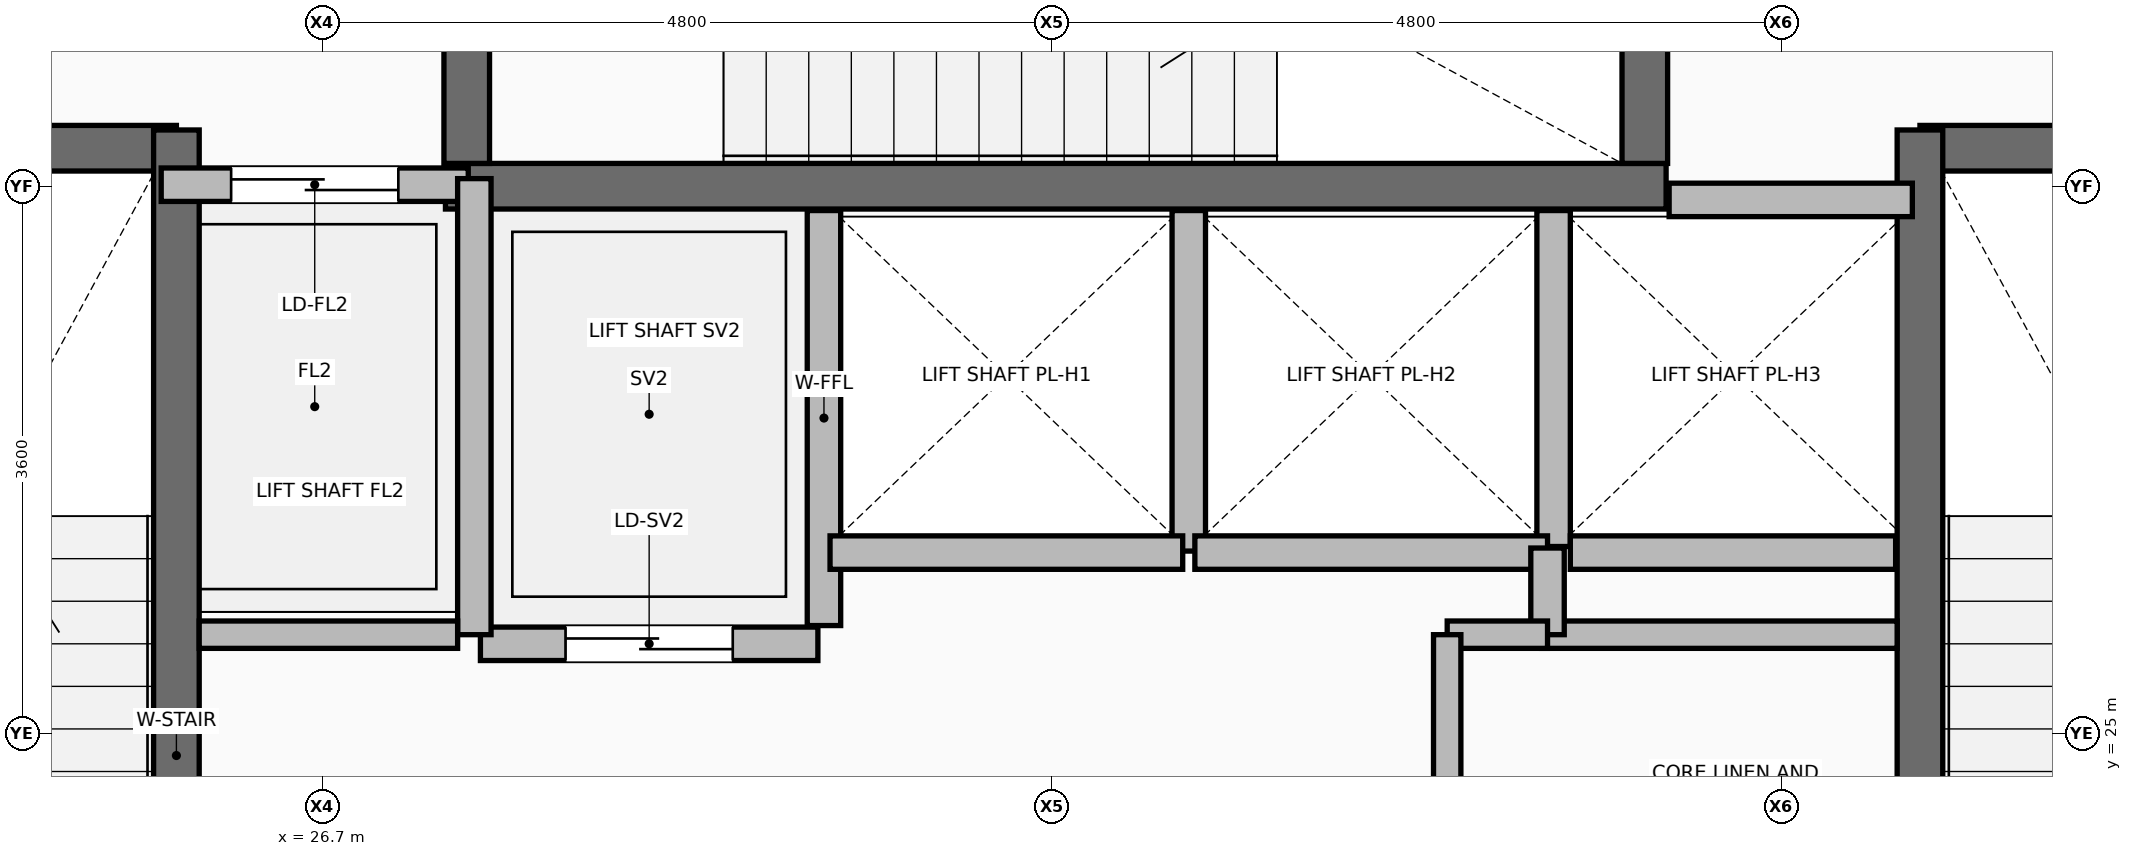
"""IFC4 building model, lengths in metres.
Left out: names, types, materials, properties, quantities, classifications, styles, units other than length and angle.
Written with IfcOpenShell. Run it as: python <this file> out.ifc"""

import sys

from ifc_helpers import new_model, si_unit, direction, frame, frame_2d, origin, place, context, subcontext, project, spatial, rectangle, extrude, element, fill, save


model = new_model("IFC4")
c1 = context("Model", 3, precision=1e-05, world=origin(), true_north=direction((0.0, 1.0)))
c2 = subcontext(c1, "Body", "Model", "MODEL_VIEW")
j1 = project(units=[si_unit("LENGTHUNIT", "METRE"), si_unit("PLANEANGLEUNIT", "RADIAN")], contexts=[c1])
p1 = place(None, origin())
s1 = spatial("IfcSite", under=j1, at=p1, CompositionType="ELEMENT")
p2 = place(p1, origin())
s2 = spatial("IfcBuilding", under=s1, at=p2, CompositionType="ELEMENT")
p3 = place(p2, frame((0.0, 0.0, 290.1)))
s3 = spatial("IfcBuildingStorey", under=s2, at=p3, CompositionType="ELEMENT", Elevation=290.1)
p4 = place(p3, frame((30.0, 25.71, 0.0), z_axis=(0.0, 0.0, 1.0), x_axis=(0.0, 1.0, 0.0)))
e1 = element("IfcWall", 1, at=p4, inside=s3, PredefinedType="PARTITIONING", context=c2, shape_type="SweptSolid", body=[
    extrude(rectangle(XDim=2.73, YDim=0.22, at=frame_2d((1.365, 0.0))), origin(), (0.0, 0.0, 1.0), 4.595),
])
p5 = place(p3, frame((32.4, 26.2, 0.0), z_axis=(0.0, 0.0, 1.0), x_axis=(0.0, 1.0, 0.0)))
e2 = element("IfcWall", 2, at=p5, inside=s3, PredefinedType="PARTITIONING", context=c2, shape_type="SweptSolid", body=[
    extrude(rectangle(XDim=2.24, YDim=0.22, at=frame_2d((1.12, 0.0))), origin(), (0.0, 0.0, 1.0), 4.595),
])
p6 = place(p3, frame((34.8, 26.23, 0.0), z_axis=(0.0, 0.0, 1.0), x_axis=(0.0, 1.0, 0.0)))
e3 = element("IfcWall", 3, at=p6, inside=s3, PredefinedType="PARTITIONING", context=c2, shape_type="SweptSolid", body=[
    extrude(rectangle(XDim=2.21, YDim=0.22, at=frame_2d((1.105, 0.0))), origin(), (0.0, 0.0, 1.0), 4.595),
])
p7 = place(p3, frame((34.91, 26.19, 0.0), z_axis=(0.0, 0.0, 1.0), x_axis=(1.0, 0.0, 0.0)))
e4 = element("IfcWall", 4, at=p7, inside=s3, PredefinedType="PARTITIONING", context=c2, shape_type="SweptSolid", body=[
    extrude(rectangle(XDim=2.14, YDim=0.22, at=frame_2d((1.07, 0.0))), origin(), (0.0, 0.0, 1.0), 4.595),
])
p8 = place(p3, frame((22.075, 28.85, 0.0), z_axis=(0.0, 0.0, 1.0), x_axis=(1.0, 0.0, 0.0)))
e5 = element("IfcWall", 5, at=p8, inside=s3, PredefinedType="SHEAR", context=c2, shape_type="SweptSolid", body=[
    extrude(rectangle(XDim=3.665, YDim=0.3, at=frame_2d((1.833, 0.0))), origin(), (0.0, 0.0, 1.0), 4.62),
])
p9 = place(p3, frame((25.74, 20.98, 0.0), z_axis=(0.0, 0.0, 1.0), x_axis=(0.0, 1.0, 0.0)))
e6 = element("IfcWall", 6, at=p9, inside=s3, PredefinedType="SHEAR", context=c2, shape_type="SweptSolid", body=[
    extrude(rectangle(XDim=7.99, YDim=0.3, at=frame_2d((3.995, 0.0))), origin(), (0.0, 0.0, 1.0), 4.62),
])
p10 = place(p3, frame((37.21, 28.85, 0.0), z_axis=(0.0, 0.0, 1.0), x_axis=(1.0, 0.0, 0.0)))
e7 = element("IfcWall", 7, at=p10, inside=s3, PredefinedType="SHEAR", context=c2, shape_type="SweptSolid", body=[
    extrude(rectangle(XDim=3.715, YDim=0.3, at=frame_2d((1.857, 0.0))), origin(), (0.0, 0.0, 1.0), 4.62),
])
p11 = place(p3, frame((37.21, 20.98, 0.0), z_axis=(0.0, 0.0, 1.0), x_axis=(0.0, 1.0, 0.0)))
e8 = element("IfcWall", 8, at=p11, inside=s3, PredefinedType="SHEAR", context=c2, shape_type="SweptSolid", body=[
    extrude(rectangle(XDim=7.99, YDim=0.3, at=frame_2d((3.995, 0.0))), origin(), (0.0, 0.0, 1.0), 4.62),
])
p12 = place(p3, frame((27.51, 28.6, 0.0), z_axis=(0.0, 0.0, 1.0), x_axis=(1.0, 0.0, 0.0)))
e9 = element("IfcWall", 9, at=p12, inside=s3, PredefinedType="SHEAR", context=c2, shape_type="SweptSolid", body=[
    extrude(rectangle(XDim=8.03, YDim=0.3, at=frame_2d((4.015, 0.0))), origin(), (0.0, 0.0, 1.0), 4.62),
])
p13 = place(p3, frame((27.65, 28.75, 0.0), z_axis=(0.0, 0.0, 1.0), x_axis=(0.0, 1.0, 0.0)))
e10 = element("IfcWall", 10, at=p13, inside=s3, PredefinedType="SHEAR", context=c2, shape_type="SweptSolid", body=[
    extrude(rectangle(XDim=3.525, YDim=0.3, at=frame_2d((1.762, 0.0))), origin(), (0.0, 0.0, 1.0), 4.62),
])
p14 = place(p13, frame((1.0, 0.0, 0.0)))
e11 = element("IfcOpeningElement", 11, at=p14, cuts=e10, PredefinedType="OPENING", context=c2, shape_type="SweptSolid", body=[
    extrude(rectangle(XDim=1.05, YDim=2.1, at=frame_2d((0.525, 1.05))), frame((0.0, 0.16, 0.0), z_axis=(0.0, -1.0, 0.0), x_axis=(1.0, 0.0, 0.0)), (0.0, 0.0, 1.0), 0.32),
])
p15 = place(p3, frame((35.4, 28.75, 0.0), z_axis=(0.0, 0.0, 1.0), x_axis=(0.0, 1.0, 0.0)))
e12 = element("IfcWall", 12, at=p15, inside=s3, PredefinedType="SHEAR", context=c2, shape_type="SweptSolid", body=[
    extrude(rectangle(XDim=3.525, YDim=0.3, at=frame_2d((1.762, 0.0))), origin(), (0.0, 0.0, 1.0), 4.62),
])
p16 = place(p3, frame((25.64, 28.61, 0.0), z_axis=(0.0, 0.0, 1.0), x_axis=(1.0, 0.0, 0.0)))
e13 = element("IfcWall", 13, at=p16, inside=s3, PredefinedType="PARTITIONING", context=c2, shape_type="SweptSolid", body=[
    extrude(rectangle(XDim=2.02, YDim=0.22, at=frame_2d((1.01, 0.0))), origin(), (0.0, 0.0, 1.0), 4.6),
])
p17 = place(p16, frame((0.46, 0.0, 0.0)))
e14 = element("IfcOpeningElement", 14, at=p17, cuts=e13, PredefinedType="OPENING", context=c2, shape_type="SweptSolid", body=[
    extrude(rectangle(XDim=1.1, YDim=2.2, at=frame_2d((0.55, 1.1))), frame((0.0, 0.12, 0.0), z_axis=(0.0, -1.0, 0.0), x_axis=(1.0, 0.0, 0.0)), (0.0, 0.0, 1.0), 0.24),
])
p18 = place(p3, frame((27.74, 25.59, 0.0), z_axis=(0.0, 0.0, 1.0), x_axis=(1.0, 0.0, 0.0)))
e15 = element("IfcWall", 15, at=p18, inside=s3, PredefinedType="PARTITIONING", context=c2, shape_type="SweptSolid", body=[
    extrude(rectangle(XDim=2.22, YDim=0.22, at=frame_2d((1.11, 0.0))), origin(), (0.0, 0.0, 1.0), 4.6),
])
p19 = place(p18, frame((0.56, 0.0, 0.0)))
e16 = element("IfcOpeningElement", 16, at=p19, cuts=e15, PredefinedType="OPENING", context=c2, shape_type="SweptSolid", body=[
    extrude(rectangle(XDim=1.1, YDim=2.2, at=frame_2d((0.55, 1.1))), frame((0.0, 0.12, 0.0), z_axis=(0.0, -1.0, 0.0), x_axis=(1.0, 0.0, 0.0)), (0.0, 0.0, 1.0), 0.24),
])
for number, where, z_axis, x_axis in (
    (17, (30.04, 26.19, 0.0), (0.0, 0.0, 1.0), (1.0, 0.0, 0.0)),
    (18, (32.44, 26.19, 0.0), (0.0, 0.0, 1.0), (1.0, 0.0, 0.0)),
):
    element("IfcWall", number, at=place(p3, frame(where, z_axis=z_axis, x_axis=x_axis)), inside=s3, PredefinedType="PARTITIONING", context=c2, shape_type="SweptSolid", body=[
        extrude(rectangle(XDim=2.32, YDim=0.22, at=frame_2d((1.16, 0.0))), origin(), (0.0, 0.0, 1.0), 4.6),
    ])
p20 = place(p3, frame((35.56, 28.51, 0.0), z_axis=(0.0, 0.0, 1.0), x_axis=(1.0, 0.0, 0.0)))
e19 = element("IfcWall", 19, at=p20, inside=s3, PredefinedType="PARTITIONING", context=c2, shape_type="SweptSolid", body=[
    extrude(rectangle(XDim=1.6, YDim=0.22, at=frame_2d((0.8, 0.0))), origin(), (0.0, 0.0, 1.0), 4.6),
])
p21 = place(p3, frame((27.7, 25.65, 0.0), z_axis=(0.0, 0.0, 1.0), x_axis=(0.0, 1.0, 0.0)))
e20 = element("IfcWall", 20, at=p21, inside=s3, PredefinedType="PARTITIONING", context=c2, shape_type="SweptSolid", body=[
    extrude(rectangle(XDim=3.0, YDim=0.22, at=frame_2d((1.5, 0.0))), origin(), (0.0, 0.0, 1.0), 4.6),
])
p22 = place(p3, frame((25.89, 25.65, 0.0), z_axis=(0.0, 0.0, 1.0), x_axis=(1.0, 0.0, 0.0)))
e21 = element("IfcWall", 21, at=p22, inside=s3, PredefinedType="PARTITIONING", context=c2, shape_type="SweptSolid", body=[
    extrude(rectangle(XDim=1.7, YDim=0.18, at=frame_2d((0.85, 0.0))), origin(), (0.0, 0.0, 1.0), 4.6),
])
p23 = place(p3, frame((34.72, 25.65, 0.0), z_axis=(0.0, 0.0, 1.0), x_axis=(1.0, 0.0, 0.0)))
e22 = element("IfcWall", 22, at=p23, inside=s3, PredefinedType="PARTITIONING", context=c2, shape_type="SweptSolid", body=[
    extrude(rectangle(XDim=2.34, YDim=0.18, at=frame_2d((1.17, 0.0))), origin(), (0.0, 0.0, 1.0), 4.6),
])
p24 = place(p3, frame((34.76, 25.65, 0.0), z_axis=(0.0, 0.0, 1.0), x_axis=(0.0, 1.0, 0.0)))
e23 = element("IfcWall", 23, at=p24, inside=s3, PredefinedType="PARTITIONING", context=c2, shape_type="SweptSolid", body=[
    extrude(rectangle(XDim=0.57, YDim=0.22, at=frame_2d((0.285, 0.0))), origin(), (0.0, 0.0, 1.0), 4.6),
])
p25 = place(p3, frame((34.1, 25.65, 0.0), z_axis=(0.0, 0.0, 1.0), x_axis=(1.0, 0.0, 0.0)))
e24 = element("IfcWall", 24, at=p25, inside=s3, PredefinedType="PARTITIONING", context=c2, shape_type="SweptSolid", body=[
    extrude(rectangle(XDim=0.66, YDim=0.18, at=frame_2d((0.33, 0.0))), origin(), (0.0, 0.0, 1.0), 4.6),
])
p26 = place(p3, frame((34.1, 21.1, 0.0), z_axis=(0.0, 0.0, 1.0), x_axis=(0.0, 1.0, 0.0)))
e25 = element("IfcWall", 25, at=p26, inside=s3, PredefinedType="PARTITIONING", context=c2, shape_type="SweptSolid", body=[
    extrude(rectangle(XDim=4.55, YDim=0.18, at=frame_2d((2.275, 0.0))), origin(), (0.0, 0.0, 1.0), 4.6),
])
p27 = place(p26, frame((1.825, 0.0, 0.0)))
e26 = element("IfcOpeningElement", 26, at=p27, cuts=e25, PredefinedType="OPENING", context=c2, shape_type="SweptSolid", body=[
    extrude(rectangle(XDim=0.9, YDim=2.1, at=frame_2d((0.45, 1.05))), frame((0.0, 0.1, 0.0), z_axis=(0.0, -1.0, 0.0), x_axis=(1.0, 0.0, 0.0)), (0.0, 0.0, 1.0), 0.2),
])
p28 = place(p17, origin())
e27 = element("IfcDoor", 27, at=p28, inside=s3, OperationType="DOUBLE_DOOR_SLIDING", PredefinedType="DOOR", context=c2, shape_type="SweptSolid", body=[
    extrude(rectangle(XDim=1.1, YDim=2.2, at=frame_2d((0.55, 1.1))), frame((0.0, 0.025, 0.0), z_axis=(0.0, -1.0, 0.0), x_axis=(1.0, 0.0, 0.0)), (0.0, 0.0, 1.0), 0.05),
])
fill(e14, e27)
p29 = place(p19, frame((1.1, 0.0, 0.0), z_axis=(0.0, 0.0, 1.0), x_axis=(-1.0, 0.0, 0.0)))
e28 = element("IfcDoor", 28, at=p29, inside=s3, OperationType="DOUBLE_DOOR_SLIDING", PredefinedType="DOOR", context=c2, shape_type="SweptSolid", body=[
    extrude(rectangle(XDim=1.1, YDim=2.2, at=frame_2d((0.55, 1.1))), frame((0.0, 0.025, 0.0), z_axis=(0.0, -1.0, 0.0), x_axis=(1.0, 0.0, 0.0)), (0.0, 0.0, 1.0), 0.05),
])
fill(e16, e28)
save(model, sys.argv[1])
